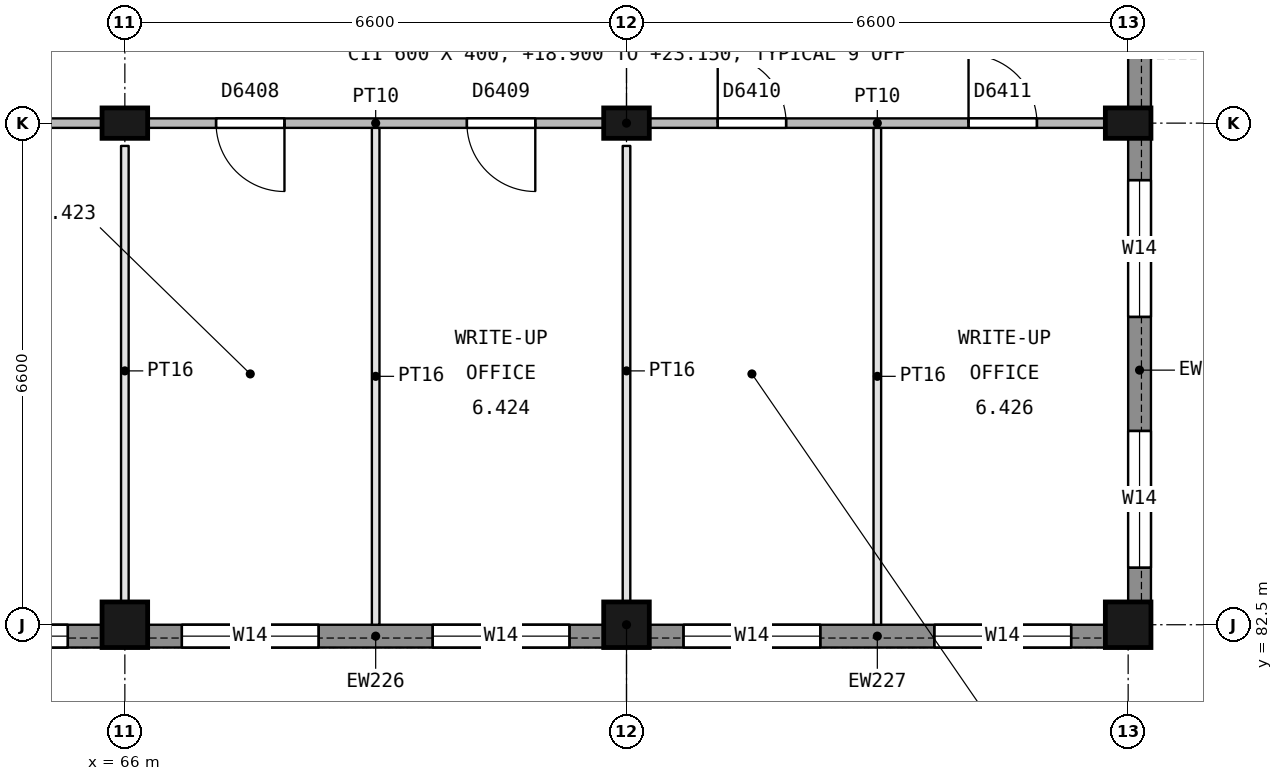
"""IFC4 building model, lengths in metres.
Left out: names, types, materials, properties, quantities, classifications, styles, units other than length and angle.
Written with IfcOpenShell. Run it as: python <this file> out.ifc"""

import sys

from ifc_helpers import new_model, si_unit, direction, frame, frame_2d, origin, origin_2d, place, context, subcontext, project, spatial, rectangle, extrude, element, fill, save


model = new_model("IFC4")
c1 = context("Model", 3, precision=1e-05, world=origin(), true_north=direction((0.0, 1.0)))
c2 = subcontext(c1, "Body", "Model", "MODEL_VIEW")
j1 = project(units=[si_unit("LENGTHUNIT", "METRE"), si_unit("PLANEANGLEUNIT", "RADIAN")], contexts=[c1])
p1 = place(None, origin())
s1 = spatial("IfcSite", under=j1, at=p1, CompositionType="ELEMENT")
p2 = place(p1, origin())
s2 = spatial("IfcBuilding", under=s1, at=p2, CompositionType="ELEMENT")
p3 = place(p2, frame((0.0, 0.0, 18.9)))
s3 = spatial("IfcBuildingStorey", under=s2, at=p3, CompositionType="ELEMENT", Elevation=18.9)
p4 = place(p3, frame((66.0, 82.5, 0.0), z_axis=(0.0, 0.0, 1.0), x_axis=(1.0, 0.0, 0.0)))
e1 = element("IfcColumn", 1, at=p4, inside=s3, PredefinedType="COLUMN", context=c2, shape_type="SweptSolid", body=[
    extrude(rectangle(XDim=0.6, YDim=0.6, at=origin_2d()), origin(), (0.0, 0.0, 1.0), 4.25),
])
p5 = place(p3, frame((66.0, 89.1, 0.0), z_axis=(0.0, 0.0, 1.0), x_axis=(1.0, 0.0, 0.0)))
e2 = element("IfcColumn", 2, at=p5, inside=s3, PredefinedType="COLUMN", context=c2, shape_type="SweptSolid", body=[
    extrude(rectangle(XDim=0.6, YDim=0.4, at=origin_2d()), origin(), (0.0, 0.0, 1.0), 4.25),
])
p6 = place(p3, frame((72.6, 82.5, 0.0), z_axis=(0.0, 0.0, 1.0), x_axis=(1.0, 0.0, 0.0)))
e3 = element("IfcColumn", 3, at=p6, inside=s3, PredefinedType="COLUMN", context=c2, shape_type="SweptSolid", body=[
    extrude(rectangle(XDim=0.6, YDim=0.6, at=origin_2d()), origin(), (0.0, 0.0, 1.0), 4.25),
])
p7 = place(p3, frame((72.6, 89.1, 0.0), z_axis=(0.0, 0.0, 1.0), x_axis=(1.0, 0.0, 0.0)))
e4 = element("IfcColumn", 4, at=p7, inside=s3, PredefinedType="COLUMN", context=c2, shape_type="SweptSolid", body=[
    extrude(rectangle(XDim=0.6, YDim=0.4, at=origin_2d()), origin(), (0.0, 0.0, 1.0), 4.25),
])
p8 = place(p3, frame((79.2, 82.5, 0.0), z_axis=(0.0, 0.0, 1.0), x_axis=(1.0, 0.0, 0.0)))
e5 = element("IfcColumn", 5, at=p8, inside=s3, PredefinedType="COLUMN", context=c2, shape_type="SweptSolid", body=[
    extrude(rectangle(XDim=0.6, YDim=0.6, at=origin_2d()), origin(), (0.0, 0.0, 1.0), 4.25),
])
p9 = place(p3, frame((79.2, 89.1, 0.0), z_axis=(0.0, 0.0, 1.0), x_axis=(1.0, 0.0, 0.0)))
e6 = element("IfcColumn", 6, at=p9, inside=s3, PredefinedType="COLUMN", context=c2, shape_type="SweptSolid", body=[
    extrude(rectangle(XDim=0.6, YDim=0.4, at=origin_2d()), origin(), (0.0, 0.0, 1.0), 4.25),
])
p10 = place(p3, frame((79.35, 88.9, 0.0), z_axis=(0.0, 0.0, 1.0), x_axis=(0.0, -1.0, 0.0)))
e7 = element("IfcWall", 7, at=p10, inside=s3, PredefinedType="STANDARD", context=c2, shape_type="SweptSolid", body=[
    extrude(rectangle(XDim=6.1, YDim=0.3, at=frame_2d((3.05, 0.0))), origin(), (0.0, 0.0, 1.0), 3.65),
])
p11 = place(p10, frame((3.85, 0.0, 0.9)))
e8 = element("IfcOpeningElement", 8, at=p11, cuts=e7, PredefinedType="OPENING", context=c2, shape_type="SweptSolid", body=[
    extrude(rectangle(XDim=1.8, YDim=1.5, at=frame_2d((0.9, 0.75))), frame((0.0, 0.16, 0.0), z_axis=(0.0, -1.0, 0.0), x_axis=(1.0, 0.0, 0.0)), (0.0, 0.0, 1.0), 0.32),
])
p12 = place(p10, frame((0.55, 0.0, 0.9)))
e9 = element("IfcOpeningElement", 9, at=p12, cuts=e7, PredefinedType="OPENING", context=c2, shape_type="SweptSolid", body=[
    extrude(rectangle(XDim=1.8, YDim=1.5, at=frame_2d((0.9, 0.75))), frame((0.0, 0.16, 0.0), z_axis=(0.0, -1.0, 0.0), x_axis=(1.0, 0.0, 0.0)), (0.0, 0.0, 1.0), 0.32),
])
p13 = place(p3, frame((79.35, 92.4, 0.0), z_axis=(0.0, 0.0, 1.0), x_axis=(0.0, -1.0, 0.0)))
e10 = element("IfcWall", 10, at=p13, inside=s3, PredefinedType="STANDARD", context=c2, shape_type="SweptSolid", body=[
    extrude(rectangle(XDim=3.1, YDim=0.3, at=frame_2d((1.55, 0.0))), origin(), (0.0, 0.0, 1.0), 3.65),
])
p14 = place(p13, frame((1.05, 0.0, 1.1)))
e11 = element("IfcOpeningElement", 11, at=p14, cuts=e10, PredefinedType="OPENING", context=c2, shape_type="SweptSolid", body=[
    extrude(rectangle(XDim=1.2, YDim=1.2, at=frame_2d((0.6, 0.6))), frame((0.0, 0.16, 0.0), z_axis=(0.0, -1.0, 0.0), x_axis=(1.0, 0.0, 0.0)), (0.0, 0.0, 1.0), 0.32),
])
p15 = place(p3, frame((65.7, 82.35, 0.0), z_axis=(0.0, 0.0, 1.0), x_axis=(-1.0, 0.0, 0.0)))
e12 = element("IfcWall", 12, at=p15, inside=s3, PredefinedType="STANDARD", context=c2, shape_type="SweptSolid", body=[
    extrude(rectangle(XDim=6.0, YDim=0.3, at=frame_2d((3.0, 0.0))), origin(), (0.0, 0.0, 1.0), 3.65),
])
p16 = place(p15, frame((3.75, 0.0, 0.9)))
e13 = element("IfcOpeningElement", 13, at=p16, cuts=e12, PredefinedType="OPENING", context=c2, shape_type="SweptSolid", body=[
    extrude(rectangle(XDim=1.8, YDim=1.5, at=frame_2d((0.9, 0.75))), frame((0.0, 0.16, 0.0), z_axis=(0.0, -1.0, 0.0), x_axis=(1.0, 0.0, 0.0)), (0.0, 0.0, 1.0), 0.32),
])
p17 = place(p15, frame((0.45, 0.0, 0.9)))
e14 = element("IfcOpeningElement", 14, at=p17, cuts=e12, PredefinedType="OPENING", context=c2, shape_type="SweptSolid", body=[
    extrude(rectangle(XDim=1.8, YDim=1.5, at=frame_2d((0.9, 0.75))), frame((0.0, 0.16, 0.0), z_axis=(0.0, -1.0, 0.0), x_axis=(1.0, 0.0, 0.0)), (0.0, 0.0, 1.0), 0.32),
])
p18 = place(p3, frame((72.3, 82.35, 0.0), z_axis=(0.0, 0.0, 1.0), x_axis=(-1.0, 0.0, 0.0)))
e15 = element("IfcWall", 15, at=p18, inside=s3, PredefinedType="STANDARD", context=c2, shape_type="SweptSolid", body=[
    extrude(rectangle(XDim=6.0, YDim=0.3, at=frame_2d((3.0, 0.0))), origin(), (0.0, 0.0, 1.0), 3.65),
])
p19 = place(p18, frame((3.75, 0.0, 0.9)))
e16 = element("IfcOpeningElement", 16, at=p19, cuts=e15, PredefinedType="OPENING", context=c2, shape_type="SweptSolid", body=[
    extrude(rectangle(XDim=1.8, YDim=1.5, at=frame_2d((0.9, 0.75))), frame((0.0, 0.16, 0.0), z_axis=(0.0, -1.0, 0.0), x_axis=(1.0, 0.0, 0.0)), (0.0, 0.0, 1.0), 0.32),
])
p20 = place(p18, frame((0.45, 0.0, 0.9)))
e17 = element("IfcOpeningElement", 17, at=p20, cuts=e15, PredefinedType="OPENING", context=c2, shape_type="SweptSolid", body=[
    extrude(rectangle(XDim=1.8, YDim=1.5, at=frame_2d((0.9, 0.75))), frame((0.0, 0.16, 0.0), z_axis=(0.0, -1.0, 0.0), x_axis=(1.0, 0.0, 0.0)), (0.0, 0.0, 1.0), 0.32),
])
p21 = place(p3, frame((78.9, 82.35, 0.0), z_axis=(0.0, 0.0, 1.0), x_axis=(-1.0, 0.0, 0.0)))
e18 = element("IfcWall", 18, at=p21, inside=s3, PredefinedType="STANDARD", context=c2, shape_type="SweptSolid", body=[
    extrude(rectangle(XDim=6.0, YDim=0.3, at=frame_2d((3.0, 0.0))), origin(), (0.0, 0.0, 1.0), 3.65),
])
p22 = place(p21, frame((3.75, 0.0, 0.9)))
e19 = element("IfcOpeningElement", 19, at=p22, cuts=e18, PredefinedType="OPENING", context=c2, shape_type="SweptSolid", body=[
    extrude(rectangle(XDim=1.8, YDim=1.5, at=frame_2d((0.9, 0.75))), frame((0.0, 0.16, 0.0), z_axis=(0.0, -1.0, 0.0), x_axis=(1.0, 0.0, 0.0)), (0.0, 0.0, 1.0), 0.32),
])
p23 = place(p21, frame((0.45, 0.0, 0.9)))
e20 = element("IfcOpeningElement", 20, at=p23, cuts=e18, PredefinedType="OPENING", context=c2, shape_type="SweptSolid", body=[
    extrude(rectangle(XDim=1.8, YDim=1.5, at=frame_2d((0.9, 0.75))), frame((0.0, 0.16, 0.0), z_axis=(0.0, -1.0, 0.0), x_axis=(1.0, 0.0, 0.0)), (0.0, 0.0, 1.0), 0.32),
])
p24 = place(p3, frame((59.7, 89.1, 0.0), z_axis=(0.0, 0.0, 1.0), x_axis=(1.0, 0.0, 0.0)))
e21 = element("IfcWall", 21, at=p24, inside=s3, PredefinedType="PARTITIONING", context=c2, shape_type="SweptSolid", body=[
    extrude(rectangle(XDim=6.0, YDim=0.125, at=frame_2d((3.0, 0.0))), origin(), (0.0, 0.0, 1.0), 3.65),
])
p25 = place(p3, frame((72.3, 89.1, 0.0), z_axis=(0.0, 0.0, 1.0), x_axis=(-1.0, 0.0, 0.0)))
e22 = element("IfcWall", 22, at=p25, inside=s3, PredefinedType="PARTITIONING", context=c2, shape_type="SweptSolid", body=[
    extrude(rectangle(XDim=6.0, YDim=0.125, at=frame_2d((3.0, 0.0))), origin(), (0.0, 0.0, 1.0), 3.65),
])
p26 = place(p25, frame((4.2, 0.0, 0.0)))
e23 = element("IfcOpeningElement", 23, at=p26, cuts=e22, PredefinedType="OPENING", context=c2, shape_type="SweptSolid", body=[
    extrude(rectangle(XDim=0.9, YDim=2.1, at=frame_2d((0.45, 1.05))), frame((0.0, 0.073, 0.0), z_axis=(0.0, -1.0, 0.0), x_axis=(1.0, 0.0, 0.0)), (0.0, 0.0, 1.0), 0.145),
])
p27 = place(p25, frame((0.9, 0.0, 0.0)))
e24 = element("IfcOpeningElement", 24, at=p27, cuts=e22, PredefinedType="OPENING", context=c2, shape_type="SweptSolid", body=[
    extrude(rectangle(XDim=0.9, YDim=2.1, at=frame_2d((0.45, 1.05))), frame((0.0, 0.073, 0.0), z_axis=(0.0, -1.0, 0.0), x_axis=(1.0, 0.0, 0.0)), (0.0, 0.0, 1.0), 0.145),
])
p28 = place(p3, frame((78.9, 89.1, 0.0), z_axis=(0.0, 0.0, 1.0), x_axis=(-1.0, 0.0, 0.0)))
e25 = element("IfcWall", 25, at=p28, inside=s3, PredefinedType="PARTITIONING", context=c2, shape_type="SweptSolid", body=[
    extrude(rectangle(XDim=6.0, YDim=0.125, at=frame_2d((3.0, 0.0))), origin(), (0.0, 0.0, 1.0), 3.65),
])
p29 = place(p28, frame((4.2, 0.0, 0.0)))
e26 = element("IfcOpeningElement", 26, at=p29, cuts=e25, PredefinedType="OPENING", context=c2, shape_type="SweptSolid", body=[
    extrude(rectangle(XDim=0.9, YDim=2.1, at=frame_2d((0.45, 1.05))), frame((0.0, 0.073, 0.0), z_axis=(0.0, -1.0, 0.0), x_axis=(1.0, 0.0, 0.0)), (0.0, 0.0, 1.0), 0.145),
])
p30 = place(p28, frame((0.9, 0.0, 0.0)))
e27 = element("IfcOpeningElement", 27, at=p30, cuts=e25, PredefinedType="OPENING", context=c2, shape_type="SweptSolid", body=[
    extrude(rectangle(XDim=0.9, YDim=2.1, at=frame_2d((0.45, 1.05))), frame((0.0, 0.073, 0.0), z_axis=(0.0, -1.0, 0.0), x_axis=(1.0, 0.0, 0.0)), (0.0, 0.0, 1.0), 0.145),
])
p31 = place(p3, frame((66.0, 82.8, 0.0), z_axis=(0.0, 0.0, 1.0), x_axis=(0.0, 1.0, 0.0)))
e28 = element("IfcWall", 28, at=p31, inside=s3, PredefinedType="PARTITIONING", context=c2, shape_type="SweptSolid", body=[
    extrude(rectangle(XDim=6.0, YDim=0.1, at=frame_2d((3.0, 0.0))), origin(), (0.0, 0.0, 1.0), 3.65),
])
p32 = place(p3, frame((69.3, 82.5, 0.0), z_axis=(0.0, 0.0, 1.0), x_axis=(0.0, 1.0, 0.0)))
e29 = element("IfcWall", 29, at=p32, inside=s3, PredefinedType="PARTITIONING", context=c2, shape_type="SweptSolid", body=[
    extrude(rectangle(XDim=6.537, YDim=0.1, at=frame_2d((3.269, 0.0))), origin(), (0.0, 0.0, 1.0), 3.65),
])
p33 = place(p3, frame((72.6, 82.8, 0.0), z_axis=(0.0, 0.0, 1.0), x_axis=(0.0, 1.0, 0.0)))
e30 = element("IfcWall", 30, at=p33, inside=s3, PredefinedType="PARTITIONING", context=c2, shape_type="SweptSolid", body=[
    extrude(rectangle(XDim=6.0, YDim=0.1, at=frame_2d((3.0, 0.0))), origin(), (0.0, 0.0, 1.0), 3.65),
])
p34 = place(p3, frame((75.9, 82.5, 0.0), z_axis=(0.0, 0.0, 1.0), x_axis=(0.0, 1.0, 0.0)))
e31 = element("IfcWall", 31, at=p34, inside=s3, PredefinedType="PARTITIONING", context=c2, shape_type="SweptSolid", body=[
    extrude(rectangle(XDim=6.537, YDim=0.1, at=frame_2d((3.269, 0.0))), origin(), (0.0, 0.0, 1.0), 3.65),
])
p35 = place(p11, origin())
e32 = element("IfcWindow", 32, at=p35, inside=s3, PartitioningType="SINGLE_PANEL", PredefinedType="WINDOW", context=c2, shape_type="SweptSolid", body=[
    extrude(rectangle(XDim=1.8, YDim=1.5, at=frame_2d((0.9, 0.75))), frame((0.0, 0.03, 0.0), z_axis=(0.0, -1.0, 0.0), x_axis=(1.0, 0.0, 0.0)), (0.0, 0.0, 1.0), 0.06),
])
fill(e8, e32)
p36 = place(p12, origin())
e33 = element("IfcWindow", 33, at=p36, inside=s3, PartitioningType="SINGLE_PANEL", PredefinedType="WINDOW", context=c2, shape_type="SweptSolid", body=[
    extrude(rectangle(XDim=1.8, YDim=1.5, at=frame_2d((0.9, 0.75))), frame((0.0, 0.03, 0.0), z_axis=(0.0, -1.0, 0.0), x_axis=(1.0, 0.0, 0.0)), (0.0, 0.0, 1.0), 0.06),
])
fill(e9, e33)
p37 = place(p17, origin())
e34 = element("IfcWindow", 34, at=p37, inside=s3, PartitioningType="SINGLE_PANEL", PredefinedType="WINDOW", context=c2, shape_type="SweptSolid", body=[
    extrude(rectangle(XDim=1.8, YDim=1.5, at=frame_2d((0.9, 0.75))), frame((0.0, 0.03, 0.0), z_axis=(0.0, -1.0, 0.0), x_axis=(1.0, 0.0, 0.0)), (0.0, 0.0, 1.0), 0.06),
])
fill(e14, e34)
p38 = place(p19, origin())
e35 = element("IfcWindow", 35, at=p38, inside=s3, PartitioningType="SINGLE_PANEL", PredefinedType="WINDOW", context=c2, shape_type="SweptSolid", body=[
    extrude(rectangle(XDim=1.8, YDim=1.5, at=frame_2d((0.9, 0.75))), frame((0.0, 0.03, 0.0), z_axis=(0.0, -1.0, 0.0), x_axis=(1.0, 0.0, 0.0)), (0.0, 0.0, 1.0), 0.06),
])
fill(e16, e35)
p39 = place(p20, origin())
e36 = element("IfcWindow", 36, at=p39, inside=s3, PartitioningType="SINGLE_PANEL", PredefinedType="WINDOW", context=c2, shape_type="SweptSolid", body=[
    extrude(rectangle(XDim=1.8, YDim=1.5, at=frame_2d((0.9, 0.75))), frame((0.0, 0.03, 0.0), z_axis=(0.0, -1.0, 0.0), x_axis=(1.0, 0.0, 0.0)), (0.0, 0.0, 1.0), 0.06),
])
fill(e17, e36)
p40 = place(p22, origin())
e37 = element("IfcWindow", 37, at=p40, inside=s3, PartitioningType="SINGLE_PANEL", PredefinedType="WINDOW", context=c2, shape_type="SweptSolid", body=[
    extrude(rectangle(XDim=1.8, YDim=1.5, at=frame_2d((0.9, 0.75))), frame((0.0, 0.03, 0.0), z_axis=(0.0, -1.0, 0.0), x_axis=(1.0, 0.0, 0.0)), (0.0, 0.0, 1.0), 0.06),
])
fill(e19, e37)
p41 = place(p23, origin())
e38 = element("IfcWindow", 38, at=p41, inside=s3, PartitioningType="SINGLE_PANEL", PredefinedType="WINDOW", context=c2, shape_type="SweptSolid", body=[
    extrude(rectangle(XDim=1.8, YDim=1.5, at=frame_2d((0.9, 0.75))), frame((0.0, 0.03, 0.0), z_axis=(0.0, -1.0, 0.0), x_axis=(1.0, 0.0, 0.0)), (0.0, 0.0, 1.0), 0.06),
])
fill(e20, e38)
p42 = place(p26, origin())
e39 = element("IfcDoor", 39, at=p42, inside=s3, OperationType="SINGLE_SWING_LEFT", PredefinedType="DOOR", context=c2, shape_type="SweptSolid", body=[
    extrude(rectangle(XDim=0.9, YDim=2.1, at=frame_2d((0.45, 1.05))), frame((0.0, 0.025, 0.0), z_axis=(0.0, -1.0, 0.0), x_axis=(1.0, 0.0, 0.0)), (0.0, 0.0, 1.0), 0.05),
])
fill(e23, e39)
p43 = place(p27, origin())
e40 = element("IfcDoor", 40, at=p43, inside=s3, OperationType="SINGLE_SWING_LEFT", PredefinedType="DOOR", context=c2, shape_type="SweptSolid", body=[
    extrude(rectangle(XDim=0.9, YDim=2.1, at=frame_2d((0.45, 1.05))), frame((0.0, 0.025, 0.0), z_axis=(0.0, -1.0, 0.0), x_axis=(1.0, 0.0, 0.0)), (0.0, 0.0, 1.0), 0.05),
])
fill(e24, e40)
p44 = place(p29, origin())
e41 = element("IfcDoor", 41, at=p44, inside=s3, OperationType="SINGLE_SWING_RIGHT", PredefinedType="DOOR", context=c2, shape_type="SweptSolid", body=[
    extrude(rectangle(XDim=0.9, YDim=2.1, at=frame_2d((0.45, 1.05))), frame((0.0, 0.025, 0.0), z_axis=(0.0, -1.0, 0.0), x_axis=(1.0, 0.0, 0.0)), (0.0, 0.0, 1.0), 0.05),
])
fill(e26, e41)
p45 = place(p30, origin())
e42 = element("IfcDoor", 42, at=p45, inside=s3, OperationType="SINGLE_SWING_RIGHT", PredefinedType="DOOR", context=c2, shape_type="SweptSolid", body=[
    extrude(rectangle(XDim=0.9, YDim=2.1, at=frame_2d((0.45, 1.05))), frame((0.0, 0.025, 0.0), z_axis=(0.0, -1.0, 0.0), x_axis=(1.0, 0.0, 0.0)), (0.0, 0.0, 1.0), 0.05),
])
fill(e27, e42)
save(model, sys.argv[1])
